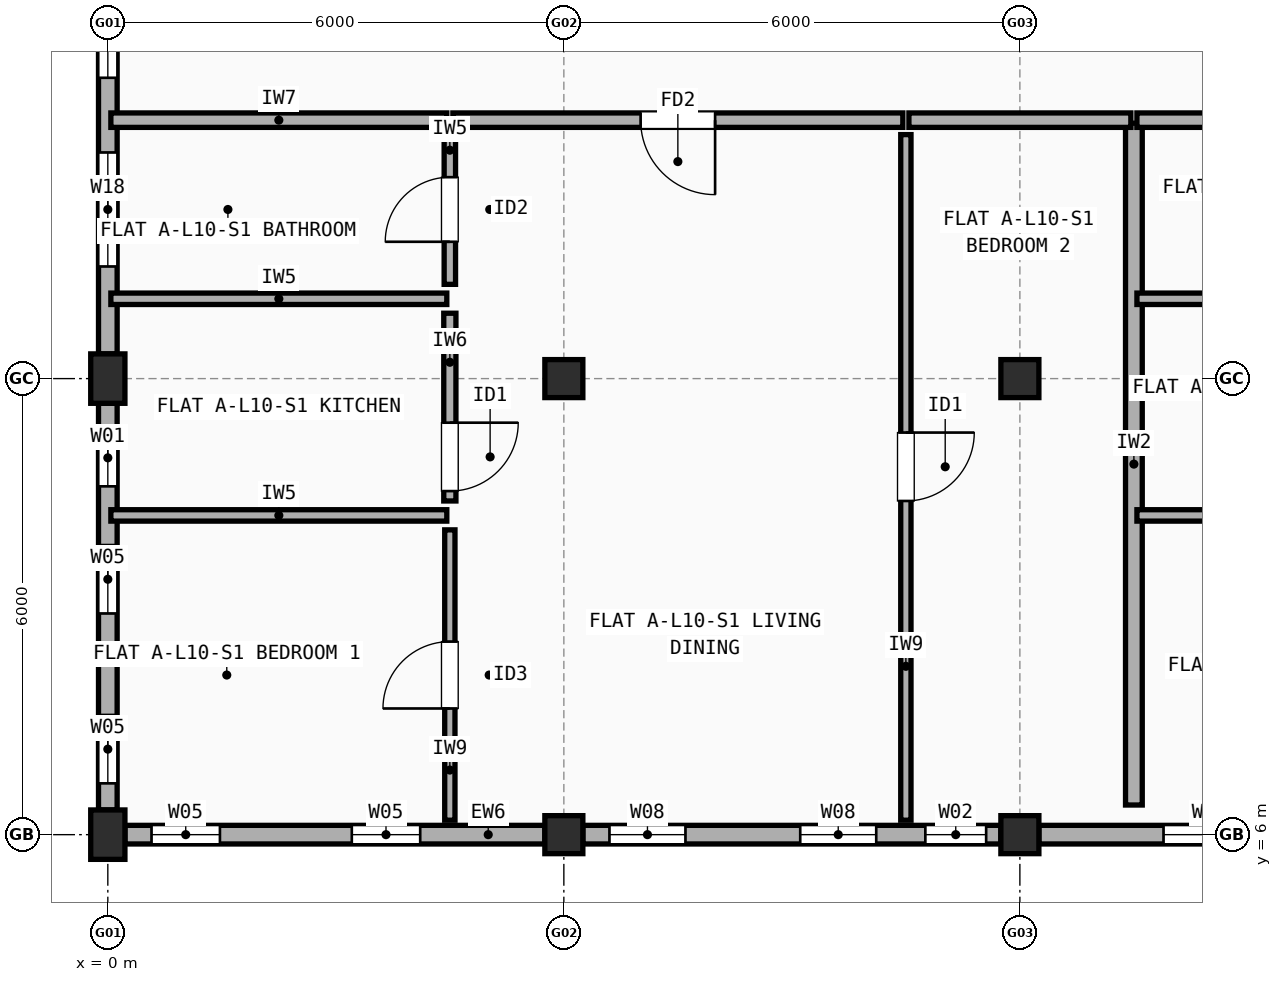
"""IFC4 building model, lengths in metres.
Left out: names, types, materials, properties, quantities, classifications, styles, units other than length and angle.
Written with IfcOpenShell. Run it as: python <this file> out.ifc"""

import sys

from ifc_helpers import new_model, si_unit, direction, frame, frame_2d, origin, origin_2d, place, context, subcontext, project, spatial, rectangle, extrude, element, fill, save


model = new_model("IFC4")
c1 = context("Model", 3, precision=1e-05, world=origin(), true_north=direction((0.0, 1.0)))
c2 = subcontext(c1, "Body", "Model", "MODEL_VIEW")
j1 = project(units=[si_unit("LENGTHUNIT", "METRE"), si_unit("PLANEANGLEUNIT", "RADIAN")], contexts=[c1])
p1 = place(None, origin())
s1 = spatial("IfcSite", under=j1, at=p1, CompositionType="ELEMENT")
p2 = place(p1, origin())
s2 = spatial("IfcBuilding", under=s1, at=p2, CompositionType="ELEMENT")
p3 = place(p2, frame((0.0, 0.0, 33.3)))
s3 = spatial("IfcBuildingStorey", under=s2, at=p3, CompositionType="ELEMENT", Elevation=33.3)
for number, where, z_axis, x_axis in (
    (1, (0.0, 6.0, 0.0), (0.0, 0.0, 1.0), (1.0, 0.0, 0.0)),
    (2, (0.0, 12.0, 0.0), (0.0, 0.0, 1.0), (1.0, 0.0, 0.0)),
):
    element("IfcColumn", number, at=place(p3, frame(where, z_axis=z_axis, x_axis=x_axis)), inside=s3, PredefinedType="COLUMN", context=c2, shape_type="SweptSolid", body=[
        extrude(rectangle(XDim=0.45, YDim=0.65, at=origin_2d()), origin(), (0.0, 0.0, 1.0), 2.99),
    ])
for number, where, z_axis, x_axis in (
    (3, (6.0, 6.0, 0.0), (0.0, 0.0, 1.0), (1.0, 0.0, 0.0)),
    (4, (6.0, 12.0, 0.0), (0.0, 0.0, 1.0), (1.0, 0.0, 0.0)),
    (5, (12.0, 6.0, 0.0), (0.0, 0.0, 1.0), (1.0, 0.0, 0.0)),
    (6, (12.0, 12.0, 0.0), (0.0, 0.0, 1.0), (1.0, 0.0, 0.0)),
):
    element("IfcColumn", number, at=place(p3, frame(where, z_axis=z_axis, x_axis=x_axis)), inside=s3, PredefinedType="COLUMN", context=c2, shape_type="SweptSolid", body=[
        extrude(rectangle(XDim=0.5, YDim=0.5, at=origin_2d()), origin(), (0.0, 0.0, 1.0), 2.99),
    ])
p4 = place(p3, frame((0.225, 6.0, 0.0), z_axis=(0.0, 0.0, 1.0), x_axis=(1.0, 0.0, 0.0)))
e7 = element("IfcWall", 7, at=p4, inside=s3, PredefinedType="STANDARD", context=c2, shape_type="SweptSolid", body=[
    extrude(rectangle(XDim=5.525, YDim=0.245, at=frame_2d((2.762, 0.0))), origin(), (0.0, 0.0, 1.0), 2.472),
])
p5 = place(p4, frame((0.35, 0.0, 0.9)))
e8 = element("IfcOpeningElement", 8, at=p5, cuts=e7, PredefinedType="OPENING", context=c2, shape_type="SweptSolid", body=[
    extrude(rectangle(XDim=0.9, YDim=1.4, at=frame_2d((0.45, 0.7))), frame((0.0, 0.133, 0.0), z_axis=(0.0, -1.0, 0.0), x_axis=(1.0, 0.0, 0.0)), (0.0, 0.0, 1.0), 0.265),
])
p6 = place(p4, frame((2.985, 0.0, 0.9)))
e9 = element("IfcOpeningElement", 9, at=p6, cuts=e7, PredefinedType="OPENING", context=c2, shape_type="SweptSolid", body=[
    extrude(rectangle(XDim=0.9, YDim=1.4, at=frame_2d((0.45, 0.7))), frame((0.0, 0.133, 0.0), z_axis=(0.0, -1.0, 0.0), x_axis=(1.0, 0.0, 0.0)), (0.0, 0.0, 1.0), 0.265),
])
p7 = place(p3, frame((6.25, 6.0, 0.0), z_axis=(0.0, 0.0, 1.0), x_axis=(1.0, 0.0, 0.0)))
e10 = element("IfcWall", 10, at=p7, inside=s3, PredefinedType="STANDARD", context=c2, shape_type="SweptSolid", body=[
    extrude(rectangle(XDim=5.5, YDim=0.245, at=frame_2d((2.75, 0.0))), origin(), (0.0, 0.0, 1.0), 2.472),
])
p8 = place(p7, frame((0.35, 0.0, 0.9)))
e11 = element("IfcOpeningElement", 11, at=p8, cuts=e10, PredefinedType="OPENING", context=c2, shape_type="SweptSolid", body=[
    extrude(rectangle(XDim=1.0, YDim=1.4, at=frame_2d((0.5, 0.7))), frame((0.0, 0.133, 0.0), z_axis=(0.0, -1.0, 0.0), x_axis=(1.0, 0.0, 0.0)), (0.0, 0.0, 1.0), 0.265),
])
p9 = place(p7, frame((2.86, 0.0, 0.9)))
e12 = element("IfcOpeningElement", 12, at=p9, cuts=e10, PredefinedType="OPENING", context=c2, shape_type="SweptSolid", body=[
    extrude(rectangle(XDim=1.0, YDim=1.4, at=frame_2d((0.5, 0.7))), frame((0.0, 0.133, 0.0), z_axis=(0.0, -1.0, 0.0), x_axis=(1.0, 0.0, 0.0)), (0.0, 0.0, 1.0), 0.265),
])
p10 = place(p7, frame((4.506, 0.0, 0.9)))
e13 = element("IfcOpeningElement", 13, at=p10, cuts=e10, PredefinedType="OPENING", context=c2, shape_type="SweptSolid", body=[
    extrude(rectangle(XDim=0.8, YDim=1.2, at=frame_2d((0.4, 0.6))), frame((0.0, 0.133, 0.0), z_axis=(0.0, -1.0, 0.0), x_axis=(1.0, 0.0, 0.0)), (0.0, 0.0, 1.0), 0.265),
])
p11 = place(p3, frame((12.25, 6.0, 0.0), z_axis=(0.0, 0.0, 1.0), x_axis=(1.0, 0.0, 0.0)))
e14 = element("IfcWall", 14, at=p11, inside=s3, PredefinedType="STANDARD", context=c2, shape_type="SweptSolid", body=[
    extrude(rectangle(XDim=5.5, YDim=0.245, at=frame_2d((2.75, 0.0))), origin(), (0.0, 0.0, 1.0), 2.472),
])
p12 = place(p11, frame((1.64, 0.0, 0.9)))
e15 = element("IfcOpeningElement", 15, at=p12, cuts=e14, PredefinedType="OPENING", context=c2, shape_type="SweptSolid", body=[
    extrude(rectangle(XDim=1.2, YDim=1.35, at=frame_2d((0.6, 0.675))), frame((0.0, 0.133, 0.0), z_axis=(0.0, -1.0, 0.0), x_axis=(1.0, 0.0, 0.0)), (0.0, 0.0, 1.0), 0.265),
])
p13 = place(p11, frame((3.95, 0.0, 0.9)))
e16 = element("IfcOpeningElement", 16, at=p13, cuts=e14, PredefinedType="OPENING", context=c2, shape_type="SweptSolid", body=[
    extrude(rectangle(XDim=1.2, YDim=1.35, at=frame_2d((0.6, 0.675))), frame((0.0, 0.133, 0.0), z_axis=(0.0, -1.0, 0.0), x_axis=(1.0, 0.0, 0.0)), (0.0, 0.0, 1.0), 0.265),
])
p14 = place(p3, frame((0.0, 17.675, 0.0), z_axis=(0.0, 0.0, 1.0), x_axis=(0.0, -1.0, 0.0)))
e17 = element("IfcWall", 17, at=p14, inside=s3, PredefinedType="STANDARD", context=c2, shape_type="SweptSolid", body=[
    extrude(rectangle(XDim=5.35, YDim=0.245, at=frame_2d((2.675, 0.0))), origin(), (0.0, 0.0, 1.0), 2.472),
])
p15 = place(p14, frame((0.518, 0.0, 0.9)))
e18 = element("IfcOpeningElement", 18, at=p15, cuts=e17, PredefinedType="OPENING", context=c2, shape_type="SweptSolid", body=[
    extrude(rectangle(XDim=1.2, YDim=1.35, at=frame_2d((0.6, 0.675))), frame((0.0, 0.133, 0.0), z_axis=(0.0, -1.0, 0.0), x_axis=(1.0, 0.0, 0.0)), (0.0, 0.0, 1.0), 0.265),
])
p16 = place(p14, frame((2.7, 0.0, 0.9)))
e19 = element("IfcOpeningElement", 19, at=p16, cuts=e17, PredefinedType="OPENING", context=c2, shape_type="SweptSolid", body=[
    extrude(rectangle(XDim=1.5, YDim=1.4, at=frame_2d((0.75, 0.7))), frame((0.0, 0.133, 0.0), z_axis=(0.0, -1.0, 0.0), x_axis=(1.0, 0.0, 0.0)), (0.0, 0.0, 1.0), 0.265),
])
p17 = place(p3, frame((0.0, 11.675, 0.0), z_axis=(0.0, 0.0, 1.0), x_axis=(0.0, -1.0, 0.0)))
e20 = element("IfcWall", 20, at=p17, inside=s3, PredefinedType="STANDARD", context=c2, shape_type="SweptSolid", body=[
    extrude(rectangle(XDim=5.35, YDim=0.245, at=frame_2d((2.675, 0.0))), origin(), (0.0, 0.0, 1.0), 2.472),
])
p18 = place(p17, frame((0.343, 0.0, 0.9)))
e21 = element("IfcOpeningElement", 21, at=p18, cuts=e20, PredefinedType="OPENING", context=c2, shape_type="SweptSolid", body=[
    extrude(rectangle(XDim=0.75, YDim=1.15, at=frame_2d((0.375, 0.575))), frame((0.0, 0.133, 0.0), z_axis=(0.0, -1.0, 0.0), x_axis=(1.0, 0.0, 0.0)), (0.0, 0.0, 1.0), 0.265),
])
p19 = place(p17, frame((1.865, 0.0, 0.9)))
e22 = element("IfcOpeningElement", 22, at=p19, cuts=e20, PredefinedType="OPENING", context=c2, shape_type="SweptSolid", body=[
    extrude(rectangle(XDim=0.9, YDim=1.4, at=frame_2d((0.45, 0.7))), frame((0.0, 0.133, 0.0), z_axis=(0.0, -1.0, 0.0), x_axis=(1.0, 0.0, 0.0)), (0.0, 0.0, 1.0), 0.265),
])
p20 = place(p17, frame((4.1, 0.0, 0.9)))
e23 = element("IfcOpeningElement", 23, at=p20, cuts=e20, PredefinedType="OPENING", context=c2, shape_type="SweptSolid", body=[
    extrude(rectangle(XDim=0.9, YDim=1.4, at=frame_2d((0.45, 0.7))), frame((0.0, 0.133, 0.0), z_axis=(0.0, -1.0, 0.0), x_axis=(1.0, 0.0, 0.0)), (0.0, 0.0, 1.0), 0.265),
])
p21 = place(p3, frame((13.5, 6.39, 0.0), z_axis=(0.0, 0.0, 1.0), x_axis=(0.0, 1.0, 0.0)))
e24 = element("IfcWall", 24, at=p21, inside=s3, PredefinedType="SOLIDWALL", context=c2, shape_type="SweptSolid", body=[
    extrude(rectangle(XDim=8.97, YDim=0.22, at=frame_2d((4.485, 0.0))), origin(), (0.0, 0.0, 1.0), 2.408),
])
p22 = place(p3, frame((0.04, 15.4, 0.0), z_axis=(0.0, 0.0, 1.0), x_axis=(1.0, 0.0, 0.0)))
e25 = element("IfcWall", 25, at=p22, inside=s3, PredefinedType="SOLIDWALL", context=c2, shape_type="SweptSolid", body=[
    extrude(rectangle(XDim=4.42, YDim=0.19, at=frame_2d((2.21, 0.0))), origin(), (0.0, 0.0, 1.0), 2.472),
])
p23 = place(p3, frame((4.54, 15.4, 0.0), z_axis=(0.0, 0.0, 1.0), x_axis=(1.0, 0.0, 0.0)))
e26 = element("IfcWall", 26, at=p23, inside=s3, PredefinedType="SOLIDWALL", context=c2, shape_type="SweptSolid", body=[
    extrude(rectangle(XDim=5.92, YDim=0.19, at=frame_2d((2.96, 0.0))), origin(), (0.0, 0.0, 1.0), 2.548),
])
p24 = place(p23, frame((2.47, 0.0, 0.0)))
e27 = element("IfcOpeningElement", 27, at=p24, cuts=e26, PredefinedType="OPENING", context=c2, shape_type="SweptSolid", body=[
    extrude(rectangle(XDim=0.98, YDim=2.15, at=frame_2d((0.49, 1.075))), frame((0.0, 0.105, 0.0), z_axis=(0.0, -1.0, 0.0), x_axis=(1.0, 0.0, 0.0)), (0.0, 0.0, 1.0), 0.21),
])
p25 = place(p3, frame((4.5, 6.19, 0.0), z_axis=(0.0, 0.0, 1.0), x_axis=(0.0, 1.0, 0.0)))
e28 = element("IfcWall", 28, at=p25, inside=s3, PredefinedType="PARTITIONING", context=c2, shape_type="SweptSolid", body=[
    extrude(rectangle(XDim=3.82, YDim=0.135, at=frame_2d((1.91, 0.0))), origin(), (0.0, 0.0, 1.0), 2.99),
])
p26 = place(p25, frame((1.47, 0.0, 0.0)))
e29 = element("IfcOpeningElement", 29, at=p26, cuts=e28, PredefinedType="OPENING", context=c2, shape_type="SweptSolid", body=[
    extrude(rectangle(XDim=0.88, YDim=2.1, at=frame_2d((0.44, 1.05))), frame((0.0, 0.077, 0.0), z_axis=(0.0, -1.0, 0.0), x_axis=(1.0, 0.0, 0.0)), (0.0, 0.0, 1.0), 0.155),
])
p27 = place(p3, frame((4.5, 10.39, 0.0), z_axis=(0.0, 0.0, 1.0), x_axis=(0.0, 1.0, 0.0)))
e30 = element("IfcWall", 30, at=p27, inside=s3, PredefinedType="PLUMBINGWALL", context=c2, shape_type="SweptSolid", body=[
    extrude(rectangle(XDim=2.47, YDim=0.16, at=frame_2d((1.235, 0.0))), origin(), (0.0, 0.0, 1.0), 2.548),
])
p28 = place(p27, frame((0.13, 0.0, 0.0)))
e31 = element("IfcOpeningElement", 31, at=p28, cuts=e30, PredefinedType="OPENING", context=c2, shape_type="SweptSolid", body=[
    extrude(rectangle(XDim=0.9, YDim=2.1, at=frame_2d((0.45, 1.05))), frame((0.0, 0.09, 0.0), z_axis=(0.0, -1.0, 0.0), x_axis=(1.0, 0.0, 0.0)), (0.0, 0.0, 1.0), 0.18),
])
p29 = place(p3, frame((4.5, 13.24, 0.0), z_axis=(0.0, 0.0, 1.0), x_axis=(0.0, 1.0, 0.0)))
e32 = element("IfcWall", 32, at=p29, inside=s3, PredefinedType="PARTITIONING", context=c2, shape_type="SweptSolid", body=[
    extrude(rectangle(XDim=1.97, YDim=0.15, at=frame_2d((0.985, 0.0))), origin(), (0.0, 0.0, 1.0), 2.99),
])
p30 = place(p29, frame((0.56, 0.0, 0.0)))
e33 = element("IfcOpeningElement", 33, at=p30, cuts=e32, PredefinedType="OPENING", context=c2, shape_type="SweptSolid", body=[
    extrude(rectangle(XDim=0.85, YDim=2.1, at=frame_2d((0.425, 1.05))), frame((0.0, 0.085, 0.0), z_axis=(0.0, -1.0, 0.0), x_axis=(1.0, 0.0, 0.0)), (0.0, 0.0, 1.0), 0.17),
])
for number, where, z_axis, x_axis in (
    (34, (0.04, 10.2, 0.0), (0.0, 0.0, 1.0), (1.0, 0.0, 0.0)),
    (35, (0.04, 13.05, 0.0), (0.0, 0.0, 1.0), (1.0, 0.0, 0.0)),
):
    element("IfcWall", number, at=place(p3, frame(where, z_axis=z_axis, x_axis=x_axis)), inside=s3, PredefinedType="PARTITIONING", context=c2, shape_type="SweptSolid", body=[
        extrude(rectangle(XDim=4.42, YDim=0.15, at=frame_2d((2.21, 0.0))), origin(), (0.0, 0.0, 1.0), 2.472),
    ])
p31 = place(p3, frame((10.54, 15.4, 0.0), z_axis=(0.0, 0.0, 1.0), x_axis=(1.0, 0.0, 0.0)))
e36 = element("IfcWall", 36, at=p31, inside=s3, PredefinedType="SOLIDWALL", context=c2, shape_type="SweptSolid", body=[
    extrude(rectangle(XDim=2.92, YDim=0.19, at=frame_2d((1.46, 0.0))), origin(), (0.0, 0.0, 1.0), 2.548),
])
p32 = place(p3, frame((10.5, 6.19, 0.0), z_axis=(0.0, 0.0, 1.0), x_axis=(0.0, 1.0, 0.0)))
e37 = element("IfcWall", 37, at=p32, inside=s3, PredefinedType="PARTITIONING", context=c2, shape_type="SweptSolid", body=[
    extrude(rectangle(XDim=9.02, YDim=0.135, at=frame_2d((4.51, 0.0))), origin(), (0.0, 0.0, 1.0), 2.508),
])
p33 = place(p32, frame((4.2, 0.0, 0.0)))
e38 = element("IfcOpeningElement", 38, at=p33, cuts=e37, PredefinedType="OPENING", context=c2, shape_type="SweptSolid", body=[
    extrude(rectangle(XDim=0.9, YDim=2.1, at=frame_2d((0.45, 1.05))), frame((0.0, 0.077, 0.0), z_axis=(0.0, -1.0, 0.0), x_axis=(1.0, 0.0, 0.0)), (0.0, 0.0, 1.0), 0.155),
])
p34 = place(p3, frame((13.54, 15.4, 0.0), z_axis=(0.0, 0.0, 1.0), x_axis=(1.0, 0.0, 0.0)))
e39 = element("IfcWall", 39, at=p34, inside=s3, PredefinedType="SOLIDWALL", context=c2, shape_type="SweptSolid", body=[
    extrude(rectangle(XDim=4.42, YDim=0.19, at=frame_2d((2.21, 0.0))), origin(), (0.0, 0.0, 1.0), 2.508),
])
p35 = place(p3, frame((13.54, 10.2, 0.0), z_axis=(0.0, 0.0, 1.0), x_axis=(1.0, 0.0, 0.0)))
e40 = element("IfcWall", 40, at=p35, inside=s3, PredefinedType="PARTITIONING", context=c2, shape_type="SweptSolid", body=[
    extrude(rectangle(XDim=4.42, YDim=0.15, at=frame_2d((2.21, 0.0))), origin(), (0.0, 0.0, 1.0), 2.548),
])
p36 = place(p3, frame((13.54, 13.05, 0.0), z_axis=(0.0, 0.0, 1.0), x_axis=(1.0, 0.0, 0.0)))
e41 = element("IfcWall", 41, at=p36, inside=s3, PredefinedType="PARTITIONING", context=c2, shape_type="SweptSolid", body=[
    extrude(rectangle(XDim=4.42, YDim=0.15, at=frame_2d((2.21, 0.0))), origin(), (0.0, 0.0, 1.0), 2.508),
])
p37 = place(p5, origin())
e42 = element("IfcWindow", 42, at=p37, inside=s3, PartitioningType="SINGLE_PANEL", PredefinedType="WINDOW", context=c2, shape_type="SweptSolid", body=[
    extrude(rectangle(XDim=0.9, YDim=1.4, at=frame_2d((0.45, 0.7))), frame((0.0, 0.03, 0.0), z_axis=(0.0, -1.0, 0.0), x_axis=(1.0, 0.0, 0.0)), (0.0, 0.0, 1.0), 0.06),
])
fill(e8, e42)
p38 = place(p6, origin())
e43 = element("IfcWindow", 43, at=p38, inside=s3, PartitioningType="SINGLE_PANEL", PredefinedType="WINDOW", context=c2, shape_type="SweptSolid", body=[
    extrude(rectangle(XDim=0.9, YDim=1.4, at=frame_2d((0.45, 0.7))), frame((0.0, 0.03, 0.0), z_axis=(0.0, -1.0, 0.0), x_axis=(1.0, 0.0, 0.0)), (0.0, 0.0, 1.0), 0.06),
])
fill(e9, e43)
p39 = place(p8, origin())
e44 = element("IfcWindow", 44, at=p39, inside=s3, PartitioningType="SINGLE_PANEL", PredefinedType="WINDOW", context=c2, shape_type="SweptSolid", body=[
    extrude(rectangle(XDim=1.0, YDim=1.4, at=frame_2d((0.5, 0.7))), frame((0.0, 0.03, 0.0), z_axis=(0.0, -1.0, 0.0), x_axis=(1.0, 0.0, 0.0)), (0.0, 0.0, 1.0), 0.06),
])
fill(e11, e44)
p40 = place(p9, origin())
e45 = element("IfcWindow", 45, at=p40, inside=s3, PartitioningType="SINGLE_PANEL", PredefinedType="WINDOW", context=c2, shape_type="SweptSolid", body=[
    extrude(rectangle(XDim=1.0, YDim=1.4, at=frame_2d((0.5, 0.7))), frame((0.0, 0.03, 0.0), z_axis=(0.0, -1.0, 0.0), x_axis=(1.0, 0.0, 0.0)), (0.0, 0.0, 1.0), 0.06),
])
fill(e12, e45)
p41 = place(p12, origin())
e46 = element("IfcWindow", 46, at=p41, inside=s3, PartitioningType="SINGLE_PANEL", PredefinedType="WINDOW", context=c2, shape_type="SweptSolid", body=[
    extrude(rectangle(XDim=1.2, YDim=1.35, at=frame_2d((0.6, 0.675))), frame((0.0, 0.03, 0.0), z_axis=(0.0, -1.0, 0.0), x_axis=(1.0, 0.0, 0.0)), (0.0, 0.0, 1.0), 0.06),
])
fill(e15, e46)
p42 = place(p15, origin())
e47 = element("IfcWindow", 47, at=p42, inside=s3, PartitioningType="SINGLE_PANEL", PredefinedType="WINDOW", context=c2, shape_type="SweptSolid", body=[
    extrude(rectangle(XDim=1.2, YDim=1.35, at=frame_2d((0.6, 0.675))), frame((0.0, 0.03, 0.0), z_axis=(0.0, -1.0, 0.0), x_axis=(1.0, 0.0, 0.0)), (0.0, 0.0, 1.0), 0.06),
])
fill(e18, e47)
p43 = place(p16, origin())
e48 = element("IfcWindow", 48, at=p43, inside=s3, PartitioningType="SINGLE_PANEL", PredefinedType="WINDOW", context=c2, shape_type="SweptSolid", body=[
    extrude(rectangle(XDim=1.5, YDim=1.4, at=frame_2d((0.75, 0.7))), frame((0.0, 0.03, 0.0), z_axis=(0.0, -1.0, 0.0), x_axis=(1.0, 0.0, 0.0)), (0.0, 0.0, 1.0), 0.06),
])
fill(e19, e48)
p44 = place(p18, origin())
e49 = element("IfcWindow", 49, at=p44, inside=s3, PartitioningType="SINGLE_PANEL", PredefinedType="WINDOW", context=c2, shape_type="SweptSolid", body=[
    extrude(rectangle(XDim=0.75, YDim=1.15, at=frame_2d((0.375, 0.575))), frame((0.0, 0.03, 0.0), z_axis=(0.0, -1.0, 0.0), x_axis=(1.0, 0.0, 0.0)), (0.0, 0.0, 1.0), 0.06),
])
fill(e21, e49)
p45 = place(p19, origin())
e50 = element("IfcWindow", 50, at=p45, inside=s3, PartitioningType="SINGLE_PANEL", PredefinedType="WINDOW", context=c2, shape_type="SweptSolid", body=[
    extrude(rectangle(XDim=0.9, YDim=1.4, at=frame_2d((0.45, 0.7))), frame((0.0, 0.03, 0.0), z_axis=(0.0, -1.0, 0.0), x_axis=(1.0, 0.0, 0.0)), (0.0, 0.0, 1.0), 0.06),
])
fill(e22, e50)
p46 = place(p20, origin())
e51 = element("IfcWindow", 51, at=p46, inside=s3, PartitioningType="SINGLE_PANEL", PredefinedType="WINDOW", context=c2, shape_type="SweptSolid", body=[
    extrude(rectangle(XDim=0.9, YDim=1.4, at=frame_2d((0.45, 0.7))), frame((0.0, 0.03, 0.0), z_axis=(0.0, -1.0, 0.0), x_axis=(1.0, 0.0, 0.0)), (0.0, 0.0, 1.0), 0.06),
])
fill(e23, e51)
p47 = place(p10, origin())
e52 = element("IfcWindow", 52, at=p47, inside=s3, PartitioningType="SINGLE_PANEL", PredefinedType="WINDOW", context=c2, shape_type="SweptSolid", body=[
    extrude(rectangle(XDim=0.8, YDim=1.2, at=frame_2d((0.4, 0.6))), frame((0.0, 0.03, 0.0), z_axis=(0.0, -1.0, 0.0), x_axis=(1.0, 0.0, 0.0)), (0.0, 0.0, 1.0), 0.06),
])
fill(e13, e52)
p48 = place(p24, origin())
e53 = element("IfcDoor", 53, at=p48, inside=s3, OperationType="SINGLE_SWING_RIGHT", PredefinedType="DOOR", context=c2, shape_type="SweptSolid", body=[
    extrude(rectangle(XDim=0.98, YDim=2.15, at=frame_2d((0.49, 1.075))), frame((0.0, 0.025, 0.0), z_axis=(0.0, -1.0, 0.0), x_axis=(1.0, 0.0, 0.0)), (0.0, 0.0, 1.0), 0.05),
])
fill(e27, e53)
p49 = place(p26, origin())
e54 = element("IfcDoor", 54, at=p49, inside=s3, OperationType="SINGLE_SWING_LEFT", PredefinedType="DOOR", context=c2, shape_type="SweptSolid", body=[
    extrude(rectangle(XDim=0.88, YDim=2.1, at=frame_2d((0.44, 1.05))), frame((0.0, 0.025, 0.0), z_axis=(0.0, -1.0, 0.0), x_axis=(1.0, 0.0, 0.0)), (0.0, 0.0, 1.0), 0.05),
])
fill(e29, e54)
p50 = place(p28, origin())
e55 = element("IfcDoor", 55, at=p50, inside=s3, OperationType="SINGLE_SWING_RIGHT", PredefinedType="DOOR", context=c2, shape_type="SweptSolid", body=[
    extrude(rectangle(XDim=0.9, YDim=2.1, at=frame_2d((0.45, 1.05))), frame((0.0, 0.025, 0.0), z_axis=(0.0, -1.0, 0.0), x_axis=(1.0, 0.0, 0.0)), (0.0, 0.0, 1.0), 0.05),
])
fill(e31, e55)
p51 = place(p30, origin())
e56 = element("IfcDoor", 56, at=p51, inside=s3, OperationType="SINGLE_SWING_LEFT", PredefinedType="DOOR", context=c2, shape_type="SweptSolid", body=[
    extrude(rectangle(XDim=0.85, YDim=2.1, at=frame_2d((0.425, 1.05))), frame((0.0, 0.025, 0.0), z_axis=(0.0, -1.0, 0.0), x_axis=(1.0, 0.0, 0.0)), (0.0, 0.0, 1.0), 0.05),
])
fill(e33, e56)
p52 = place(p33, origin())
e57 = element("IfcDoor", 57, at=p52, inside=s3, OperationType="SINGLE_SWING_RIGHT", PredefinedType="DOOR", context=c2, shape_type="SweptSolid", body=[
    extrude(rectangle(XDim=0.9, YDim=2.1, at=frame_2d((0.45, 1.05))), frame((0.0, 0.025, 0.0), z_axis=(0.0, -1.0, 0.0), x_axis=(1.0, 0.0, 0.0)), (0.0, 0.0, 1.0), 0.05),
])
fill(e38, e57)
save(model, sys.argv[1])
